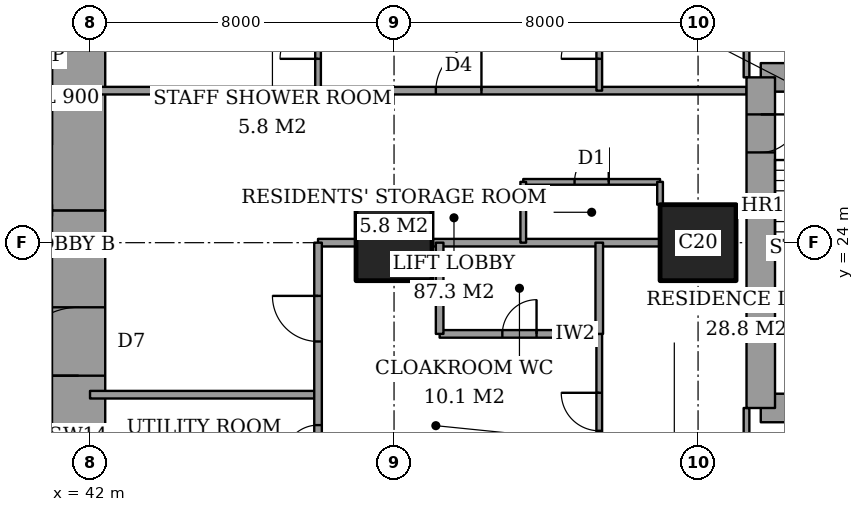
"""IFC4 building model, lengths in metres.
Left out: names, types, materials, properties, quantities, classifications, styles, units other than length and angle.
Written with IfcOpenShell. Run it as: python <this file> out.ifc"""

import sys

from ifc_helpers import new_model, si_unit, direction, frame, frame_2d, origin, origin_2d, place, context, subcontext, project, spatial, rectangle, extrude, element, fill, save


model = new_model("IFC4")
c1 = context("Model", 3, precision=1e-05, world=origin(), true_north=direction((0.0, 1.0)))
c2 = subcontext(c1, "Body", "Model", "MODEL_VIEW")
j1 = project(units=[si_unit("LENGTHUNIT", "METRE"), si_unit("PLANEANGLEUNIT", "RADIAN")], contexts=[c1])
p1 = place(None, origin())
s1 = spatial("IfcSite", under=j1, at=p1, CompositionType="ELEMENT")
p2 = place(p1, origin())
s2 = spatial("IfcBuilding", under=s1, at=p2, CompositionType="ELEMENT")
p3 = place(p2, frame((0.0, 0.0, 161.0)))
s3 = spatial("IfcBuildingStorey", under=s2, at=p3, CompositionType="ELEMENT", Elevation=161.0)
for number, where, z_axis, x_axis in (
    (1, (50.0, 24.0, 0.0), (0.0, 0.0, 1.0), (1.0, 0.0, 0.0)),
    (2, (58.0, 24.0, 0.0), (0.0, 0.0, 1.0), (1.0, 0.0, 0.0)),
):
    element("IfcColumn", number, at=place(p3, frame(where, z_axis=z_axis, x_axis=x_axis)), inside=s3, PredefinedType="COLUMN", context=c2, shape_type="SweptSolid", body=[
        extrude(rectangle(XDim=2.0, YDim=2.0, at=origin_2d()), origin(), (0.0, 0.0, 1.0), 3.6),
    ])
p4 = place(p3, frame((41.7, 13.0, 0.0), z_axis=(0.0, 0.0, 1.0), x_axis=(0.0, 1.0, 0.0)))
e3 = element("IfcWall", 3, at=p4, inside=s3, PredefinedType="SHEAR", context=c2, shape_type="SweptSolid", body=[
    extrude(rectangle(XDim=11.85, YDim=1.4, at=frame_2d((5.925, 0.0))), origin(), (0.0, 0.0, 1.0), 3.6),
])
p5 = place(p4, frame((7.5, 0.0, 0.0)))
e4 = element("IfcOpeningElement", 4, at=p5, cuts=e3, PredefinedType="OPENING", context=c2, shape_type="SweptSolid", body=[
    extrude(rectangle(XDim=1.8, YDim=2.4, at=frame_2d((0.9, 1.2))), frame((0.0, 0.71, 0.0), z_axis=(0.0, -1.0, 0.0), x_axis=(1.0, 0.0, 0.0)), (0.0, 0.0, 1.0), 1.42),
])
p6 = place(p3, frame((41.7, 24.85, 0.0), z_axis=(0.0, 0.0, 1.0), x_axis=(0.0, 1.0, 0.0)))
e5 = element("IfcWall", 5, at=p6, inside=s3, PredefinedType="SHEAR", context=c2, shape_type="SweptSolid", body=[
    extrude(rectangle(XDim=10.15, YDim=1.4, at=frame_2d((5.075, 0.0))), origin(), (0.0, 0.0, 1.0), 3.6),
])
for number, where, z_axis, x_axis in (
    (6, (59.65, 19.65, 0.0), (0.0, 0.0, 1.0), (1.0, 0.0, 0.0)),
    (7, (64.1, 28.35, 0.0), (0.0, 0.0, 1.0), (-1.0, 0.0, 0.0)),
):
    element("IfcWall", number, at=place(p3, frame(where, z_axis=z_axis, x_axis=x_axis)), inside=s3, PredefinedType="SHEAR", context=c2, shape_type="SweptSolid", body=[
        extrude(rectangle(XDim=4.45, YDim=0.75, at=frame_2d((2.225, 0.0))), origin(), (0.0, 0.0, 1.0), 3.6),
    ])
p7 = place(p3, frame((59.65, 28.35, 0.0), z_axis=(0.0, 0.0, 1.0), x_axis=(0.0, -1.0, 0.0)))
e8 = element("IfcWall", 8, at=p7, inside=s3, PredefinedType="SHEAR", context=c2, shape_type="SweptSolid", body=[
    extrude(rectangle(XDim=8.7, YDim=0.75, at=frame_2d((4.35, 0.0))), origin(), (0.0, 0.0, 1.0), 3.6),
])
p8 = place(p7, frame((0.975, 0.0, 0.0)))
e9 = element("IfcOpeningElement", 9, at=p8, cuts=e8, PredefinedType="OPENING", context=c2, shape_type="SweptSolid", body=[
    extrude(rectangle(XDim=1.0, YDim=2.1, at=frame_2d((0.5, 1.05))), frame((0.0, 0.385, 0.0), z_axis=(0.0, -1.0, 0.0), x_axis=(1.0, 0.0, 0.0)), (0.0, 0.0, 1.0), 0.77),
])
p9 = place(p3, frame((42.0, 20.0, 0.0), z_axis=(0.0, 0.0, 1.0), x_axis=(1.0, 0.0, 0.0)))
e10 = element("IfcWall", 10, at=p9, inside=s3, PredefinedType="PARTITIONING", context=c2, shape_type="SweptSolid", body=[
    extrude(rectangle(XDim=6.0, YDim=0.2, at=frame_2d((3.0, 0.0))), origin(), (0.0, 0.0, 1.0), 3.35),
])
p10 = place(p3, frame((51.2, 21.6, 0.0), z_axis=(0.0, 0.0, 1.0), x_axis=(1.0, 0.0, 0.0)))
e11 = element("IfcWall", 11, at=p10, inside=s3, PredefinedType="PARTITIONING", context=c2, shape_type="SweptSolid", body=[
    extrude(rectangle(XDim=4.2, YDim=0.2, at=frame_2d((2.1, 0.0))), origin(), (0.0, 0.0, 1.0), 3.35),
])
p11 = place(p10, frame((1.65, 0.0, 0.0)))
e12 = element("IfcOpeningElement", 12, at=p11, cuts=e11, PredefinedType="OPENING", context=c2, shape_type="SweptSolid", body=[
    extrude(rectangle(XDim=0.9, YDim=2.1, at=frame_2d((0.45, 1.05))), frame((0.0, 0.11, 0.0), z_axis=(0.0, -1.0, 0.0), x_axis=(1.0, 0.0, 0.0)), (0.0, 0.0, 1.0), 0.22),
])
p12 = place(p3, frame((48.0, 24.0, 0.0), z_axis=(0.0, 0.0, 1.0), x_axis=(1.0, 0.0, 0.0)))
e13 = element("IfcWall", 13, at=p12, inside=s3, PredefinedType="PARTITIONING", context=c2, shape_type="SweptSolid", body=[
    extrude(rectangle(XDim=1.0, YDim=0.2, at=frame_2d((0.5, 0.0))), origin(), (0.0, 0.0, 1.0), 3.35),
])
p13 = place(p3, frame((51.0, 24.0, 0.0), z_axis=(0.0, 0.0, 1.0), x_axis=(1.0, 0.0, 0.0)))
e14 = element("IfcWall", 14, at=p13, inside=s3, PredefinedType="PARTITIONING", context=c2, shape_type="SweptSolid", body=[
    extrude(rectangle(XDim=6.0, YDim=0.2, at=frame_2d((3.0, 0.0))), origin(), (0.0, 0.0, 1.0), 3.35),
])
p14 = place(p3, frame((53.4, 25.6, 0.0), z_axis=(0.0, 0.0, 1.0), x_axis=(1.0, 0.0, 0.0)))
e15 = element("IfcWall", 15, at=p14, inside=s3, PredefinedType="PARTITIONING", context=c2, shape_type="SweptSolid", body=[
    extrude(rectangle(XDim=3.6, YDim=0.15, at=frame_2d((1.8, 0.0))), origin(), (0.0, 0.0, 1.0), 3.35),
])
p15 = place(p14, frame((1.35, 0.0, 0.0)))
e16 = element("IfcOpeningElement", 16, at=p15, cuts=e15, PredefinedType="OPENING", context=c2, shape_type="SweptSolid", body=[
    extrude(rectangle(XDim=0.9, YDim=2.1, at=frame_2d((0.45, 1.05))), frame((0.0, 0.085, 0.0), z_axis=(0.0, -1.0, 0.0), x_axis=(1.0, 0.0, 0.0)), (0.0, 0.0, 1.0), 0.17),
])
p16 = place(p3, frame((42.0, 28.0, 0.0), z_axis=(0.0, 0.0, 1.0), x_axis=(1.0, 0.0, 0.0)))
e17 = element("IfcWall", 17, at=p16, inside=s3, PredefinedType="PARTITIONING", context=c2, shape_type="SweptSolid", body=[
    extrude(rectangle(XDim=17.275, YDim=0.2, at=frame_2d((8.637, 0.0))), origin(), (0.0, 0.0, 1.0), 3.35),
])
p17 = place(p16, frame((9.1, 0.0, 0.0)))
e18 = element("IfcOpeningElement", 18, at=p17, cuts=e17, PredefinedType="OPENING", context=c2, shape_type="SweptSolid", body=[
    extrude(rectangle(XDim=1.2, YDim=2.4, at=frame_2d((0.6, 1.2))), frame((0.0, 0.11, 0.0), z_axis=(0.0, -1.0, 0.0), x_axis=(1.0, 0.0, 0.0)), (0.0, 0.0, 1.0), 0.22),
])
p18 = place(p3, frame((48.0, 17.5, 0.0), z_axis=(0.0, 0.0, 1.0), x_axis=(0.0, 1.0, 0.0)))
e19 = element("IfcWall", 19, at=p18, inside=s3, PredefinedType="PARTITIONING", context=c2, shape_type="SweptSolid", body=[
    extrude(rectangle(XDim=6.5, YDim=0.2, at=frame_2d((3.25, 0.0))), origin(), (0.0, 0.0, 1.0), 3.35),
])
p19 = place(p18, frame((3.9, 0.0, 0.0)))
e20 = element("IfcOpeningElement", 20, at=p19, cuts=e19, PredefinedType="OPENING", context=c2, shape_type="SweptSolid", body=[
    extrude(rectangle(XDim=1.2, YDim=2.4, at=frame_2d((0.6, 1.2))), frame((0.0, 0.11, 0.0), z_axis=(0.0, -1.0, 0.0), x_axis=(1.0, 0.0, 0.0)), (0.0, 0.0, 1.0), 0.22),
])
p20 = place(p18, frame((0.8, 0.0, 0.0)))
e21 = element("IfcOpeningElement", 21, at=p20, cuts=e19, PredefinedType="OPENING", context=c2, shape_type="SweptSolid", body=[
    extrude(rectangle(XDim=0.9, YDim=2.1, at=frame_2d((0.45, 1.05))), frame((0.0, 0.11, 0.0), z_axis=(0.0, -1.0, 0.0), x_axis=(1.0, 0.0, 0.0)), (0.0, 0.0, 1.0), 0.22),
])
p21 = place(p3, frame((48.0, 28.0, 0.0), z_axis=(0.0, 0.0, 1.0), x_axis=(0.0, 1.0, 0.0)))
e22 = element("IfcWall", 22, at=p21, inside=s3, PredefinedType="PARTITIONING", context=c2, shape_type="SweptSolid", body=[
    extrude(rectangle(XDim=9.4, YDim=0.15, at=frame_2d((4.7, 0.0))), origin(), (0.0, 0.0, 1.0), 3.35),
])
p22 = place(p21, frame((0.837, 0.0, 0.0)))
e23 = element("IfcOpeningElement", 23, at=p22, cuts=e22, PredefinedType="OPENING", context=c2, shape_type="SweptSolid", body=[
    extrude(rectangle(XDim=1.0, YDim=2.1, at=frame_2d((0.5, 1.05))), frame((0.0, 0.085, 0.0), z_axis=(0.0, -1.0, 0.0), x_axis=(1.0, 0.0, 0.0)), (0.0, 0.0, 1.0), 0.17),
])
p23 = place(p3, frame((51.2, 21.6, 0.0), z_axis=(0.0, 0.0, 1.0), x_axis=(0.0, 1.0, 0.0)))
e24 = element("IfcWall", 24, at=p23, inside=s3, PredefinedType="PARTITIONING", context=c2, shape_type="SweptSolid", body=[
    extrude(rectangle(XDim=2.4, YDim=0.2, at=frame_2d((1.2, 0.0))), origin(), (0.0, 0.0, 1.0), 3.35),
])
p24 = place(p3, frame((53.4, 24.0, 0.0), z_axis=(0.0, 0.0, 1.0), x_axis=(0.0, 1.0, 0.0)))
e25 = element("IfcWall", 25, at=p24, inside=s3, PredefinedType="PARTITIONING", context=c2, shape_type="SweptSolid", body=[
    extrude(rectangle(XDim=1.6, YDim=0.15, at=frame_2d((0.8, 0.0))), origin(), (0.0, 0.0, 1.0), 3.35),
])
p25 = place(p3, frame((55.4, 21.6, 0.0), z_axis=(0.0, 0.0, 1.0), x_axis=(0.0, 1.0, 0.0)))
e26 = element("IfcWall", 26, at=p25, inside=s3, PredefinedType="PARTITIONING", context=c2, shape_type="SweptSolid", body=[
    extrude(rectangle(XDim=2.4, YDim=0.2, at=frame_2d((1.2, 0.0))), origin(), (0.0, 0.0, 1.0), 3.35),
])
p26 = place(p3, frame((55.4, 11.0, 0.0), z_axis=(0.0, 0.0, 1.0), x_axis=(0.0, 1.0, 0.0)))
e27 = element("IfcWall", 27, at=p26, inside=s3, PredefinedType="PARTITIONING", context=c2, shape_type="SweptSolid", body=[
    extrude(rectangle(XDim=10.6, YDim=0.15, at=frame_2d((5.3, 0.0))), origin(), (0.0, 0.0, 1.0), 3.35),
])
p27 = place(p26, frame((8.05, 0.0, 0.0)))
e28 = element("IfcOpeningElement", 28, at=p27, cuts=e27, PredefinedType="OPENING", context=c2, shape_type="SweptSolid", body=[
    extrude(rectangle(XDim=1.0, YDim=2.1, at=frame_2d((0.5, 1.05))), frame((0.0, 0.085, 0.0), z_axis=(0.0, -1.0, 0.0), x_axis=(1.0, 0.0, 0.0)), (0.0, 0.0, 1.0), 0.17),
])
p28 = place(p3, frame((55.4, 28.0, 0.0), z_axis=(0.0, 0.0, 1.0), x_axis=(0.0, 1.0, 0.0)))
e29 = element("IfcWall", 29, at=p28, inside=s3, PredefinedType="PARTITIONING", context=c2, shape_type="SweptSolid", body=[
    extrude(rectangle(XDim=9.4, YDim=0.15, at=frame_2d((4.7, 0.0))), origin(), (0.0, 0.0, 1.0), 3.35),
])
p29 = place(p28, frame((0.837, 0.0, 0.0)))
e30 = element("IfcOpeningElement", 30, at=p29, cuts=e29, PredefinedType="OPENING", context=c2, shape_type="SweptSolid", body=[
    extrude(rectangle(XDim=1.0, YDim=2.1, at=frame_2d((0.5, 1.05))), frame((0.0, 0.085, 0.0), z_axis=(0.0, -1.0, 0.0), x_axis=(1.0, 0.0, 0.0)), (0.0, 0.0, 1.0), 0.17),
])
p30 = place(p3, frame((57.0, 25.0, 0.0), z_axis=(0.0, 0.0, 1.0), x_axis=(0.0, 1.0, 0.0)))
e31 = element("IfcWall", 31, at=p30, inside=s3, PredefinedType="PARTITIONING", context=c2, shape_type="SweptSolid", body=[
    extrude(rectangle(XDim=0.6, YDim=0.15, at=frame_2d((0.3, 0.0))), origin(), (0.0, 0.0, 1.0), 3.35),
])
p31 = place(p3, frame((59.275, 17.2, 0.0), z_axis=(0.0, 0.0, 1.0), x_axis=(0.0, 1.0, 0.0)))
e32 = element("IfcWall", 32, at=p31, inside=s3, PredefinedType="PARTITIONING", context=c2, shape_type="SweptSolid", body=[
    extrude(rectangle(XDim=2.45, YDim=0.15, at=frame_2d((1.225, 0.0))), origin(), (0.0, 0.0, 1.0), 3.35),
])
p32 = place(p31, frame((0.587, 0.0, 0.0)))
e33 = element("IfcOpeningElement", 33, at=p32, cuts=e32, PredefinedType="OPENING", context=c2, shape_type="SweptSolid", body=[
    extrude(rectangle(XDim=0.9, YDim=2.1, at=frame_2d((0.45, 1.05))), frame((0.0, 0.085, 0.0), z_axis=(0.0, -1.0, 0.0), x_axis=(1.0, 0.0, 0.0)), (0.0, 0.0, 1.0), 0.17),
])
p33 = place(p3, frame((59.275, 28.35, 0.0), z_axis=(0.0, 0.0, 1.0), x_axis=(0.0, 1.0, 0.0)))
e34 = element("IfcWall", 34, at=p33, inside=s3, PredefinedType="PARTITIONING", context=c2, shape_type="SweptSolid", body=[
    extrude(rectangle(XDim=2.45, YDim=0.15, at=frame_2d((1.225, 0.0))), origin(), (0.0, 0.0, 1.0), 3.35),
])
p34 = place(p33, frame((0.913, 0.0, 0.0)))
e35 = element("IfcOpeningElement", 35, at=p34, cuts=e34, PredefinedType="OPENING", context=c2, shape_type="SweptSolid", body=[
    extrude(rectangle(XDim=1.0, YDim=2.1, at=frame_2d((0.5, 1.05))), frame((0.0, 0.085, 0.0), z_axis=(0.0, -1.0, 0.0), x_axis=(1.0, 0.0, 0.0)), (0.0, 0.0, 1.0), 0.17),
])
p35 = place(p27, origin())
e36 = element("IfcDoor", 36, at=p35, inside=s3, OperationType="SINGLE_SWING_LEFT", PredefinedType="DOOR", context=c2, shape_type="SweptSolid", body=[
    extrude(rectangle(XDim=1.0, YDim=2.1, at=frame_2d((0.5, 1.05))), frame((0.0, 0.025, 0.0), z_axis=(0.0, -1.0, 0.0), x_axis=(1.0, 0.0, 0.0)), (0.0, 0.0, 1.0), 0.05),
])
fill(e28, e36)
p36 = place(p11, origin())
e37 = element("IfcDoor", 37, at=p36, inside=s3, OperationType="SINGLE_SWING_LEFT", PredefinedType="DOOR", context=c2, shape_type="SweptSolid", body=[
    extrude(rectangle(XDim=0.9, YDim=2.1, at=frame_2d((0.45, 1.05))), frame((0.0, 0.025, 0.0), z_axis=(0.0, -1.0, 0.0), x_axis=(1.0, 0.0, 0.0)), (0.0, 0.0, 1.0), 0.05),
])
fill(e12, e37)
p37 = place(p19, origin())
e38 = element("IfcDoor", 38, at=p37, inside=s3, OperationType="SINGLE_SWING_LEFT", PredefinedType="DOOR", context=c2, shape_type="SweptSolid", body=[
    extrude(rectangle(XDim=1.2, YDim=2.4, at=frame_2d((0.6, 1.2))), frame((0.0, 0.025, 0.0), z_axis=(0.0, -1.0, 0.0), x_axis=(1.0, 0.0, 0.0)), (0.0, 0.0, 1.0), 0.05),
])
fill(e20, e38)
p38 = place(p20, origin())
e39 = element("IfcDoor", 39, at=p38, inside=s3, OperationType="SINGLE_SWING_RIGHT", PredefinedType="DOOR", context=c2, shape_type="SweptSolid", body=[
    extrude(rectangle(XDim=0.9, YDim=2.1, at=frame_2d((0.45, 1.05))), frame((0.0, 0.025, 0.0), z_axis=(0.0, -1.0, 0.0), x_axis=(1.0, 0.0, 0.0)), (0.0, 0.0, 1.0), 0.05),
])
fill(e21, e39)
p39 = place(p29, origin())
e40 = element("IfcDoor", 40, at=p39, inside=s3, OperationType="SINGLE_SWING_RIGHT", PredefinedType="DOOR", context=c2, shape_type="SweptSolid", body=[
    extrude(rectangle(XDim=1.0, YDim=2.1, at=frame_2d((0.5, 1.05))), frame((0.0, 0.025, 0.0), z_axis=(0.0, -1.0, 0.0), x_axis=(1.0, 0.0, 0.0)), (0.0, 0.0, 1.0), 0.05),
])
fill(e30, e40)
p40 = place(p17, origin())
e41 = element("IfcDoor", 41, at=p40, inside=s3, OperationType="SINGLE_SWING_LEFT", PredefinedType="DOOR", context=c2, shape_type="SweptSolid", body=[
    extrude(rectangle(XDim=1.2, YDim=2.4, at=frame_2d((0.6, 1.2))), frame((0.0, 0.025, 0.0), z_axis=(0.0, -1.0, 0.0), x_axis=(1.0, 0.0, 0.0)), (0.0, 0.0, 1.0), 0.05),
])
fill(e18, e41)
p41 = place(p22, origin())
e42 = element("IfcDoor", 42, at=p41, inside=s3, OperationType="SINGLE_SWING_RIGHT", PredefinedType="DOOR", context=c2, shape_type="SweptSolid", body=[
    extrude(rectangle(XDim=1.0, YDim=2.1, at=frame_2d((0.5, 1.05))), frame((0.0, 0.025, 0.0), z_axis=(0.0, -1.0, 0.0), x_axis=(1.0, 0.0, 0.0)), (0.0, 0.0, 1.0), 0.05),
])
fill(e23, e42)
p42 = place(p15, origin())
e43 = element("IfcDoor", 43, at=p42, inside=s3, OperationType="SINGLE_SWING_LEFT", PredefinedType="DOOR", context=c2, shape_type="SweptSolid", body=[
    extrude(rectangle(XDim=0.9, YDim=2.1, at=frame_2d((0.45, 1.05))), frame((0.0, 0.025, 0.0), z_axis=(0.0, -1.0, 0.0), x_axis=(1.0, 0.0, 0.0)), (0.0, 0.0, 1.0), 0.05),
])
fill(e16, e43)
p43 = place(p5, origin())
e44 = element("IfcDoor", 44, at=p43, inside=s3, OperationType="DOUBLE_DOOR_DOUBLE_SWING", PredefinedType="DOOR", context=c2, shape_type="SweptSolid", body=[
    extrude(rectangle(XDim=1.8, YDim=2.4, at=frame_2d((0.9, 1.2))), frame((0.0, 0.025, 0.0), z_axis=(0.0, -1.0, 0.0), x_axis=(1.0, 0.0, 0.0)), (0.0, 0.0, 1.0), 0.05),
])
fill(e4, e44)
p44 = place(p8, origin())
e45 = element("IfcDoor", 45, at=p44, inside=s3, OperationType="SINGLE_SWING_RIGHT", PredefinedType="DOOR", context=c2, shape_type="SweptSolid", body=[
    extrude(rectangle(XDim=1.0, YDim=2.1, at=frame_2d((0.5, 1.05))), frame((0.0, 0.025, 0.0), z_axis=(0.0, -1.0, 0.0), x_axis=(1.0, 0.0, 0.0)), (0.0, 0.0, 1.0), 0.05),
])
fill(e9, e45)
save(model, sys.argv[1])
